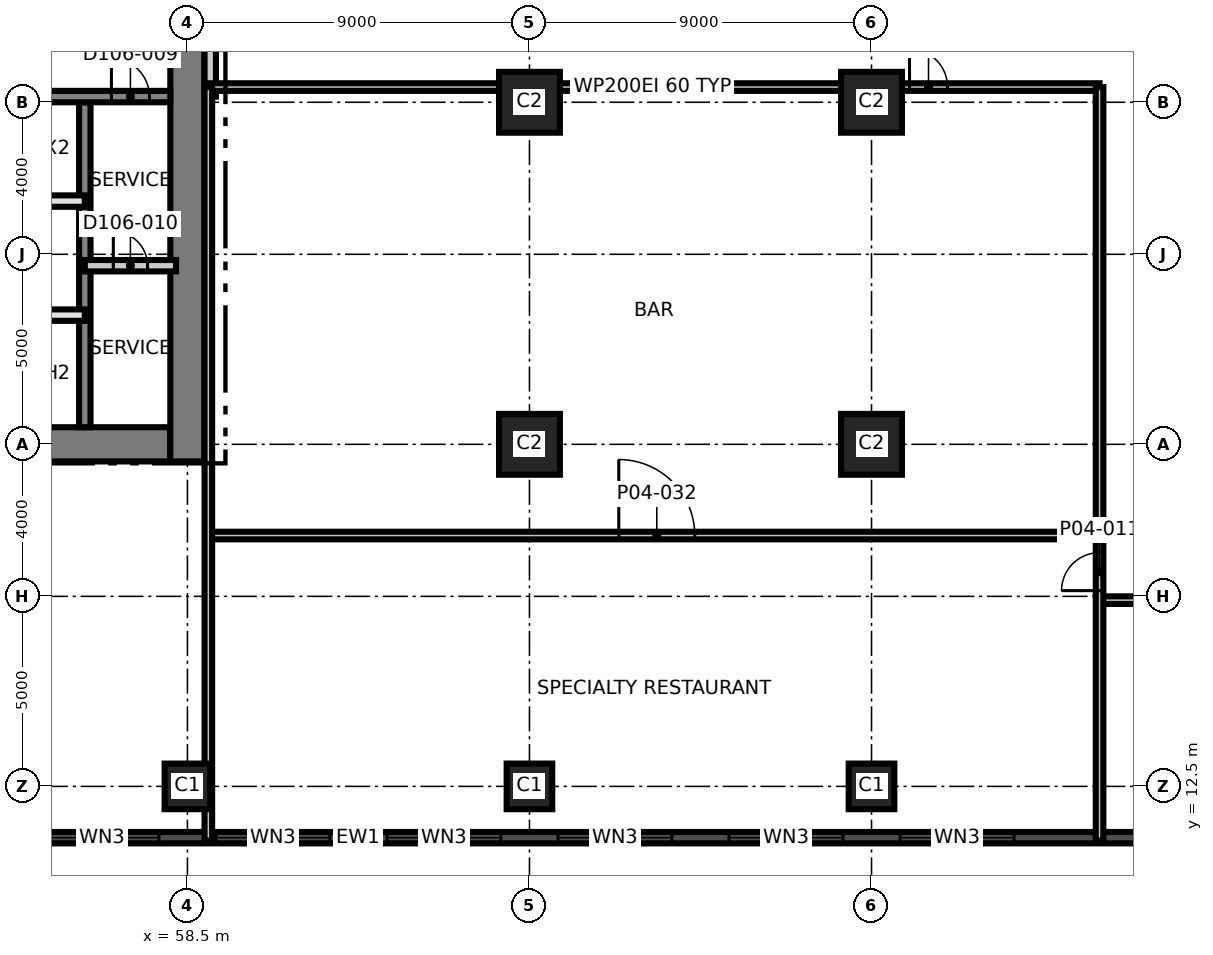
"""IFC4 building model, lengths in metres.
Left out: names, types, materials, properties, quantities, classifications, styles, units other than length and angle.
Written with IfcOpenShell. Run it as: python <this file> out.ifc"""

import sys

from ifc_helpers import new_model, si_unit, direction, frame, frame_2d, origin, origin_2d, place, context, subcontext, project, spatial, rectangle, extrude, element, fill, save


model = new_model("IFC4")
c1 = context("Model", 3, precision=1e-05, world=origin(), true_north=direction((0.0, 1.0)))
c2 = subcontext(c1, "Body", "Model", "MODEL_VIEW")
j1 = project(units=[si_unit("LENGTHUNIT", "METRE"), si_unit("PLANEANGLEUNIT", "RADIAN")], contexts=[c1])
p1 = place(None, origin())
s1 = spatial("IfcSite", under=j1, at=p1, CompositionType="ELEMENT")
p2 = place(p1, origin())
s2 = spatial("IfcBuilding", under=s1, at=p2, CompositionType="ELEMENT")
p3 = place(p2, frame((0.0, 0.0, 23.5)))
s3 = spatial("IfcBuildingStorey", under=s2, at=p3, CompositionType="ELEMENT", Elevation=23.5)
p4 = place(p3, frame((31.05, 21.5, 0.0), z_axis=(0.0, 0.0, 1.0), x_axis=(1.0, 0.0, 0.0)))
e1 = element("IfcWall", 1, at=p4, inside=s3, PredefinedType="SHEAR", context=c2, shape_type="SweptSolid", body=[
    extrude(rectangle(XDim=27.0, YDim=0.9, at=frame_2d((13.5, 0.0))), origin(), (0.0, 0.0, 1.0), 5.0),
])
p5 = place(p3, frame((58.5, 21.05, 0.0), z_axis=(0.0, 0.0, 1.0), x_axis=(0.0, 1.0, 0.0)))
e2 = element("IfcWall", 2, at=p5, inside=s3, PredefinedType="SHEAR", context=c2, shape_type="SweptSolid", body=[
    extrude(rectangle(XDim=18.9, YDim=0.9, at=frame_2d((9.45, 0.0))), origin(), (0.0, 0.0, 1.0), 5.0),
])
p6 = place(p3, frame((55.8, 21.95, 0.0), z_axis=(0.0, 0.0, 1.0), x_axis=(0.0, 1.0, 0.0)))
e3 = element("IfcWall", 3, at=p6, inside=s3, PredefinedType="SHEAR", context=c2, shape_type="SweptSolid", body=[
    extrude(rectangle(XDim=8.55, YDim=0.3, at=frame_2d((4.275, 0.0))), origin(), (0.0, 0.0, 1.0), 5.0),
])
p7 = place(p3, frame((31.95, 30.65, 0.0), z_axis=(0.0, 0.0, 1.0), x_axis=(1.0, 0.0, 0.0)))
e4 = element("IfcWall", 4, at=p7, inside=s3, PredefinedType="SHEAR", context=c2, shape_type="SweptSolid", body=[
    extrude(rectangle(XDim=26.1, YDim=0.3, at=frame_2d((13.05, 0.0))), origin(), (0.0, 0.0, 1.0), 5.0),
])
p8 = place(p7, frame((24.55, 0.0, 0.0)))
e5 = element("IfcOpeningElement", 5, at=p8, cuts=e4, PredefinedType="OPENING", context=c2, shape_type="SweptSolid", body=[
    extrude(rectangle(XDim=1.0, YDim=2.1, at=frame_2d((0.5, 1.05))), frame((0.0, 0.16, 0.0), z_axis=(0.0, -1.0, 0.0), x_axis=(1.0, 0.0, 0.0)), (0.0, 0.0, 1.0), 0.32),
])
p9 = place(p7, frame((11.35, 0.0, 0.0)))
e6 = element("IfcOpeningElement", 6, at=p9, cuts=e4, PredefinedType="OPENING", context=c2, shape_type="SweptSolid", body=[
    extrude(rectangle(XDim=1.0, YDim=2.1, at=frame_2d((0.5, 1.05))), frame((0.0, 0.16, 0.0), z_axis=(0.0, -1.0, 0.0), x_axis=(1.0, 0.0, 0.0)), (0.0, 0.0, 1.0), 0.32),
])
for number, where, z_axis, x_axis in (
    (7, (58.5, 12.5, 0.0), (0.0, 0.0, 1.0), (1.0, 0.0, 0.0)),
    (8, (67.5, 12.5, 0.0), (0.0, 0.0, 1.0), (1.0, 0.0, 0.0)),
    (9, (76.5, 12.5, 0.0), (0.0, 0.0, 1.0), (1.0, 0.0, 0.0)),
):
    element("IfcColumn", number, at=place(p3, frame(where, z_axis=z_axis, x_axis=x_axis)), inside=s3, PredefinedType="COLUMN", context=c2, shape_type="SweptSolid", body=[
        extrude(rectangle(XDim=1.2, YDim=1.2, at=origin_2d()), origin(), (0.0, 0.0, 1.0), 5.0),
    ])
for number, where, z_axis, x_axis in (
    (10, (67.5, 21.5, 0.0), (0.0, 0.0, 1.0), (1.0, 0.0, 0.0)),
    (11, (76.5, 21.5, 0.0), (0.0, 0.0, 1.0), (1.0, 0.0, 0.0)),
    (12, (67.5, 30.5, 0.0), (0.0, 0.0, 1.0), (1.0, 0.0, 0.0)),
    (13, (76.5, 30.5, 0.0), (0.0, 0.0, 1.0), (1.0, 0.0, 0.0)),
):
    element("IfcColumn", number, at=place(p3, frame(where, z_axis=z_axis, x_axis=x_axis)), inside=s3, PredefinedType="COLUMN", context=c2, shape_type="SweptSolid", body=[
        extrude(rectangle(XDim=1.6, YDim=1.6, at=origin_2d()), origin(), (0.0, 0.0, 1.0), 5.0),
    ])
p10 = place(p3, frame((27.048, 11.15, 0.0), z_axis=(0.0, 0.0, 1.0), x_axis=(1.0, 0.0, 0.0)))
e14 = element("IfcWall", 14, at=p10, inside=s3, PredefinedType="SOLIDWALL", context=c2, shape_type="SweptSolid", body=[
    extrude(rectangle(XDim=71.88, YDim=0.3, at=frame_2d((35.94, 0.0))), origin(), (0.0, 0.0, 1.0), 4.7),
])
p11 = place(p10, frame((0.726, 0.0, 0.9)))
e15 = element("IfcOpeningElement", 15, at=p11, cuts=e14, PredefinedType="OPENING", context=c2, shape_type="SweptSolid", body=[
    extrude(rectangle(XDim=3.0, YDim=2.4, at=frame_2d((1.5, 1.2))), frame((0.0, 0.16, 0.0), z_axis=(0.0, -1.0, 0.0), x_axis=(1.0, 0.0, 0.0)), (0.0, 0.0, 1.0), 0.32),
])
p12 = place(p10, frame((5.202, 0.0, 0.9)))
e16 = element("IfcOpeningElement", 16, at=p12, cuts=e14, PredefinedType="OPENING", context=c2, shape_type="SweptSolid", body=[
    extrude(rectangle(XDim=3.0, YDim=2.4, at=frame_2d((1.5, 1.2))), frame((0.0, 0.16, 0.0), z_axis=(0.0, -1.0, 0.0), x_axis=(1.0, 0.0, 0.0)), (0.0, 0.0, 1.0), 0.32),
])
p13 = place(p10, frame((9.702, 0.0, 0.9)))
e17 = element("IfcOpeningElement", 17, at=p13, cuts=e14, PredefinedType="OPENING", context=c2, shape_type="SweptSolid", body=[
    extrude(rectangle(XDim=3.0, YDim=2.4, at=frame_2d((1.5, 1.2))), frame((0.0, 0.16, 0.0), z_axis=(0.0, -1.0, 0.0), x_axis=(1.0, 0.0, 0.0)), (0.0, 0.0, 1.0), 0.32),
])
p14 = place(p10, frame((14.202, 0.0, 0.9)))
e18 = element("IfcOpeningElement", 18, at=p14, cuts=e14, PredefinedType="OPENING", context=c2, shape_type="SweptSolid", body=[
    extrude(rectangle(XDim=3.0, YDim=2.4, at=frame_2d((1.5, 1.2))), frame((0.0, 0.16, 0.0), z_axis=(0.0, -1.0, 0.0), x_axis=(1.0, 0.0, 0.0)), (0.0, 0.0, 1.0), 0.32),
])
p15 = place(p10, frame((18.702, 0.0, 0.9)))
e19 = element("IfcOpeningElement", 19, at=p15, cuts=e14, PredefinedType="OPENING", context=c2, shape_type="SweptSolid", body=[
    extrude(rectangle(XDim=3.0, YDim=2.4, at=frame_2d((1.5, 1.2))), frame((0.0, 0.16, 0.0), z_axis=(0.0, -1.0, 0.0), x_axis=(1.0, 0.0, 0.0)), (0.0, 0.0, 1.0), 0.32),
])
p16 = place(p10, frame((23.202, 0.0, 0.9)))
e20 = element("IfcOpeningElement", 20, at=p16, cuts=e14, PredefinedType="OPENING", context=c2, shape_type="SweptSolid", body=[
    extrude(rectangle(XDim=3.0, YDim=2.4, at=frame_2d((1.5, 1.2))), frame((0.0, 0.16, 0.0), z_axis=(0.0, -1.0, 0.0), x_axis=(1.0, 0.0, 0.0)), (0.0, 0.0, 1.0), 0.32),
])
p17 = place(p10, frame((27.702, 0.0, 0.9)))
e21 = element("IfcOpeningElement", 21, at=p17, cuts=e14, PredefinedType="OPENING", context=c2, shape_type="SweptSolid", body=[
    extrude(rectangle(XDim=3.0, YDim=2.4, at=frame_2d((1.5, 1.2))), frame((0.0, 0.16, 0.0), z_axis=(0.0, -1.0, 0.0), x_axis=(1.0, 0.0, 0.0)), (0.0, 0.0, 1.0), 0.32),
])
p18 = place(p10, frame((32.202, 0.0, 0.9)))
e22 = element("IfcOpeningElement", 22, at=p18, cuts=e14, PredefinedType="OPENING", context=c2, shape_type="SweptSolid", body=[
    extrude(rectangle(XDim=3.0, YDim=2.4, at=frame_2d((1.5, 1.2))), frame((0.0, 0.16, 0.0), z_axis=(0.0, -1.0, 0.0), x_axis=(1.0, 0.0, 0.0)), (0.0, 0.0, 1.0), 0.32),
])
p19 = place(p10, frame((36.702, 0.0, 0.9)))
e23 = element("IfcOpeningElement", 23, at=p19, cuts=e14, PredefinedType="OPENING", context=c2, shape_type="SweptSolid", body=[
    extrude(rectangle(XDim=3.0, YDim=2.4, at=frame_2d((1.5, 1.2))), frame((0.0, 0.16, 0.0), z_axis=(0.0, -1.0, 0.0), x_axis=(1.0, 0.0, 0.0)), (0.0, 0.0, 1.0), 0.32),
])
p20 = place(p10, frame((41.202, 0.0, 0.9)))
e24 = element("IfcOpeningElement", 24, at=p20, cuts=e14, PredefinedType="OPENING", context=c2, shape_type="SweptSolid", body=[
    extrude(rectangle(XDim=3.0, YDim=2.4, at=frame_2d((1.5, 1.2))), frame((0.0, 0.16, 0.0), z_axis=(0.0, -1.0, 0.0), x_axis=(1.0, 0.0, 0.0)), (0.0, 0.0, 1.0), 0.32),
])
p21 = place(p10, frame((45.702, 0.0, 0.9)))
e25 = element("IfcOpeningElement", 25, at=p21, cuts=e14, PredefinedType="OPENING", context=c2, shape_type="SweptSolid", body=[
    extrude(rectangle(XDim=3.0, YDim=2.4, at=frame_2d((1.5, 1.2))), frame((0.0, 0.16, 0.0), z_axis=(0.0, -1.0, 0.0), x_axis=(1.0, 0.0, 0.0)), (0.0, 0.0, 1.0), 0.32),
])
p22 = place(p10, frame((50.202, 0.0, 0.9)))
e26 = element("IfcOpeningElement", 26, at=p22, cuts=e14, PredefinedType="OPENING", context=c2, shape_type="SweptSolid", body=[
    extrude(rectangle(XDim=3.0, YDim=2.4, at=frame_2d((1.5, 1.2))), frame((0.0, 0.16, 0.0), z_axis=(0.0, -1.0, 0.0), x_axis=(1.0, 0.0, 0.0)), (0.0, 0.0, 1.0), 0.32),
])
p23 = place(p10, frame((59.202, 0.0, 0.9)))
e27 = element("IfcOpeningElement", 27, at=p23, cuts=e14, PredefinedType="OPENING", context=c2, shape_type="SweptSolid", body=[
    extrude(rectangle(XDim=3.0, YDim=2.4, at=frame_2d((1.5, 1.2))), frame((0.0, 0.16, 0.0), z_axis=(0.0, -1.0, 0.0), x_axis=(1.0, 0.0, 0.0)), (0.0, 0.0, 1.0), 0.32),
])
p24 = place(p10, frame((63.702, 0.0, 0.9)))
e28 = element("IfcOpeningElement", 28, at=p24, cuts=e14, PredefinedType="OPENING", context=c2, shape_type="SweptSolid", body=[
    extrude(rectangle(XDim=3.0, YDim=2.4, at=frame_2d((1.5, 1.2))), frame((0.0, 0.16, 0.0), z_axis=(0.0, -1.0, 0.0), x_axis=(1.0, 0.0, 0.0)), (0.0, 0.0, 1.0), 0.32),
])
p25 = place(p10, frame((68.226, 0.0, 0.9)))
e29 = element("IfcOpeningElement", 29, at=p25, cuts=e14, PredefinedType="OPENING", context=c2, shape_type="SweptSolid", body=[
    extrude(rectangle(XDim=3.0, YDim=2.4, at=frame_2d((1.5, 1.2))), frame((0.0, 0.16, 0.0), z_axis=(0.0, -1.0, 0.0), x_axis=(1.0, 0.0, 0.0)), (0.0, 0.0, 1.0), 0.32),
])
p26 = place(p3, frame((46.8, 24.9, 0.0), z_axis=(0.0, 0.0, 1.0), x_axis=(1.0, 0.0, 0.0)))
e30 = element("IfcWall", 30, at=p26, inside=s3, PredefinedType="SOLIDWALL", context=c2, shape_type="SweptSolid", body=[
    extrude(rectangle(XDim=9.0, YDim=0.3, at=frame_2d((4.5, 0.0))), origin(), (0.0, 0.0, 1.0), 4.7),
])
p27 = place(p26, frame((1.05, 0.0, 0.0)))
e31 = element("IfcOpeningElement", 31, at=p27, cuts=e30, PredefinedType="OPENING", context=c2, shape_type="SweptSolid", body=[
    extrude(rectangle(XDim=0.9, YDim=2.1, at=frame_2d((0.45, 1.05))), frame((0.0, 0.16, 0.0), z_axis=(0.0, -1.0, 0.0), x_axis=(1.0, 0.0, 0.0)), (0.0, 0.0, 1.0), 0.32),
])
p28 = place(p3, frame((55.8, 26.2, 0.0), z_axis=(0.0, 0.0, 1.0), x_axis=(1.0, 0.0, 0.0)))
e32 = element("IfcWall", 32, at=p28, inside=s3, PredefinedType="PARTITIONING", context=c2, shape_type="SweptSolid", body=[
    extrude(rectangle(XDim=2.4, YDim=0.3, at=frame_2d((1.2, 0.0))), origin(), (0.0, 0.0, 1.0), 4.7),
])
p29 = place(p28, frame((0.75, 0.0, 0.0)))
e33 = element("IfcOpeningElement", 33, at=p29, cuts=e32, PredefinedType="OPENING", context=c2, shape_type="SweptSolid", body=[
    extrude(rectangle(XDim=0.9, YDim=2.1, at=frame_2d((0.45, 1.05))), frame((0.0, 0.16, 0.0), z_axis=(0.0, -1.0, 0.0), x_axis=(1.0, 0.0, 0.0)), (0.0, 0.0, 1.0), 0.32),
])
p30 = place(p3, frame((49.8, 27.9, 0.0), z_axis=(0.0, 0.0, 1.0), x_axis=(1.0, 0.0, 0.0)))
e34 = element("IfcWall", 34, at=p30, inside=s3, PredefinedType="SOLIDWALL", context=c2, shape_type="SweptSolid", body=[
    extrude(rectangle(XDim=6.0, YDim=0.3, at=frame_2d((3.0, 0.0))), origin(), (0.0, 0.0, 1.0), 4.7),
])
p31 = place(p3, frame((59.1, 30.65, 0.0), z_axis=(0.0, 0.0, 1.0), x_axis=(0.0, 1.0, 0.0)))
e35 = element("IfcWall", 35, at=p31, inside=s3, PredefinedType="PARTITIONING", context=c2, shape_type="SweptSolid", body=[
    extrude(rectangle(XDim=2.7, YDim=0.3, at=frame_2d((1.35, 0.0))), origin(), (0.0, 0.0, 1.0), 4.7),
])
p32 = place(p3, frame((82.5, 17.4, 0.0), z_axis=(0.0, 0.0, 1.0), x_axis=(1.0, 0.0, 0.0)))
e36 = element("IfcWall", 36, at=p32, inside=s3, PredefinedType="PARTITIONING", context=c2, shape_type="SweptSolid", body=[
    extrude(rectangle(XDim=2.1, YDim=0.2, at=frame_2d((1.05, 0.0))), origin(), (0.0, 0.0, 1.0), 4.7),
])
p33 = place(p3, frame((59.05, 19.1, 0.0), z_axis=(0.0, 0.0, 1.0), x_axis=(1.0, 0.0, 0.0)))
e37 = element("IfcWall", 37, at=p33, inside=s3, PredefinedType="PARTITIONING", context=c2, shape_type="SweptSolid", body=[
    extrude(rectangle(XDim=23.45, YDim=0.2, at=frame_2d((11.725, 0.0))), origin(), (0.0, 0.0, 1.0), 4.7),
])
p34 = place(p33, frame((10.8, 0.0, 0.0)))
e38 = element("IfcOpeningElement", 38, at=p34, cuts=e37, PredefinedType="OPENING", context=c2, shape_type="SweptSolid", body=[
    extrude(rectangle(XDim=2.0, YDim=2.1, at=frame_2d((1.0, 1.05))), frame((0.0, 0.11, 0.0), z_axis=(0.0, -1.0, 0.0), x_axis=(1.0, 0.0, 0.0)), (0.0, 0.0, 1.0), 0.22),
])
p35 = place(p3, frame((58.97, 30.9, 0.0), z_axis=(0.0, 0.0, 1.0), x_axis=(1.0, 0.0, 0.0)))
e39 = element("IfcWall", 39, at=p35, inside=s3, PredefinedType="PARTITIONING", context=c2, shape_type="SweptSolid", body=[
    extrude(rectangle(XDim=23.53, YDim=0.2, at=frame_2d((11.765, 0.0))), origin(), (0.0, 0.0, 1.0), 4.7),
])
p36 = place(p35, frame((18.53, 0.0, 0.0)))
e40 = element("IfcOpeningElement", 40, at=p36, cuts=e39, PredefinedType="OPENING", context=c2, shape_type="SweptSolid", body=[
    extrude(rectangle(XDim=1.0, YDim=2.1, at=frame_2d((0.5, 1.05))), frame((0.0, 0.11, 0.0), z_axis=(0.0, -1.0, 0.0), x_axis=(1.0, 0.0, 0.0)), (0.0, 0.0, 1.0), 0.22),
])
p37 = place(p3, frame((59.05, 11.07, 0.0), z_axis=(0.0, 0.0, 1.0), x_axis=(0.0, 1.0, 0.0)))
e41 = element("IfcWall", 41, at=p37, inside=s3, PredefinedType="PARTITIONING", context=c2, shape_type="SweptSolid", body=[
    extrude(rectangle(XDim=19.83, YDim=0.2, at=frame_2d((9.915, 0.0))), origin(), (0.0, 0.0, 1.0), 4.7),
])
p38 = place(p3, frame((82.5, 11.07, 0.0), z_axis=(0.0, 0.0, 1.0), x_axis=(0.0, 1.0, 0.0)))
e42 = element("IfcWall", 42, at=p38, inside=s3, PredefinedType="PARTITIONING", context=c2, shape_type="SweptSolid", body=[
    extrude(rectangle(XDim=19.83, YDim=0.2, at=frame_2d((9.915, 0.0))), origin(), (0.0, 0.0, 1.0), 4.7),
])
p39 = place(p38, frame((6.58, 0.0, 0.0)))
e43 = element("IfcOpeningElement", 43, at=p39, cuts=e42, PredefinedType="OPENING", context=c2, shape_type="SweptSolid", body=[
    extrude(rectangle(XDim=1.0, YDim=2.1, at=frame_2d((0.5, 1.05))), frame((0.0, 0.11, 0.0), z_axis=(0.0, -1.0, 0.0), x_axis=(1.0, 0.0, 0.0)), (0.0, 0.0, 1.0), 0.22),
])
p40 = place(p17, origin())
e44 = element("IfcWindow", 44, at=p40, inside=s3, PartitioningType="SINGLE_PANEL", PredefinedType="WINDOW", context=c2, shape_type="SweptSolid", body=[
    extrude(rectangle(XDim=3.0, YDim=2.4, at=frame_2d((1.5, 1.2))), frame((0.0, 0.03, 0.0), z_axis=(0.0, -1.0, 0.0), x_axis=(1.0, 0.0, 0.0)), (0.0, 0.0, 1.0), 0.06),
])
fill(e21, e44)
p41 = place(p18, origin())
e45 = element("IfcWindow", 45, at=p41, inside=s3, PartitioningType="SINGLE_PANEL", PredefinedType="WINDOW", context=c2, shape_type="SweptSolid", body=[
    extrude(rectangle(XDim=3.0, YDim=2.4, at=frame_2d((1.5, 1.2))), frame((0.0, 0.03, 0.0), z_axis=(0.0, -1.0, 0.0), x_axis=(1.0, 0.0, 0.0)), (0.0, 0.0, 1.0), 0.06),
])
fill(e22, e45)
p42 = place(p19, origin())
e46 = element("IfcWindow", 46, at=p42, inside=s3, PartitioningType="SINGLE_PANEL", PredefinedType="WINDOW", context=c2, shape_type="SweptSolid", body=[
    extrude(rectangle(XDim=3.0, YDim=2.4, at=frame_2d((1.5, 1.2))), frame((0.0, 0.03, 0.0), z_axis=(0.0, -1.0, 0.0), x_axis=(1.0, 0.0, 0.0)), (0.0, 0.0, 1.0), 0.06),
])
fill(e23, e46)
p43 = place(p20, origin())
e47 = element("IfcWindow", 47, at=p43, inside=s3, PartitioningType="SINGLE_PANEL", PredefinedType="WINDOW", context=c2, shape_type="SweptSolid", body=[
    extrude(rectangle(XDim=3.0, YDim=2.4, at=frame_2d((1.5, 1.2))), frame((0.0, 0.03, 0.0), z_axis=(0.0, -1.0, 0.0), x_axis=(1.0, 0.0, 0.0)), (0.0, 0.0, 1.0), 0.06),
])
fill(e24, e47)
p44 = place(p21, origin())
e48 = element("IfcWindow", 48, at=p44, inside=s3, PartitioningType="SINGLE_PANEL", PredefinedType="WINDOW", context=c2, shape_type="SweptSolid", body=[
    extrude(rectangle(XDim=3.0, YDim=2.4, at=frame_2d((1.5, 1.2))), frame((0.0, 0.03, 0.0), z_axis=(0.0, -1.0, 0.0), x_axis=(1.0, 0.0, 0.0)), (0.0, 0.0, 1.0), 0.06),
])
fill(e25, e48)
p45 = place(p22, origin())
e49 = element("IfcWindow", 49, at=p45, inside=s3, PartitioningType="SINGLE_PANEL", PredefinedType="WINDOW", context=c2, shape_type="SweptSolid", body=[
    extrude(rectangle(XDim=3.0, YDim=2.4, at=frame_2d((1.5, 1.2))), frame((0.0, 0.03, 0.0), z_axis=(0.0, -1.0, 0.0), x_axis=(1.0, 0.0, 0.0)), (0.0, 0.0, 1.0), 0.06),
])
fill(e26, e49)
p46 = place(p8, origin())
e50 = element("IfcDoor", 50, at=p46, inside=s3, OperationType="SINGLE_SWING_LEFT", PredefinedType="DOOR", context=c2, shape_type="SweptSolid", body=[
    extrude(rectangle(XDim=1.0, YDim=2.1, at=frame_2d((0.5, 1.05))), frame((0.0, 0.025, 0.0), z_axis=(0.0, -1.0, 0.0), x_axis=(1.0, 0.0, 0.0)), (0.0, 0.0, 1.0), 0.05),
])
fill(e5, e50)
p47 = place(p29, origin())
e51 = element("IfcDoor", 51, at=p47, inside=s3, OperationType="SINGLE_SWING_RIGHT", PredefinedType="DOOR", context=c2, shape_type="SweptSolid", body=[
    extrude(rectangle(XDim=0.9, YDim=2.1, at=frame_2d((0.45, 1.05))), frame((0.0, 0.025, 0.0), z_axis=(0.0, -1.0, 0.0), x_axis=(1.0, 0.0, 0.0)), (0.0, 0.0, 1.0), 0.05),
])
fill(e33, e51)
p48 = place(p39, origin())
e52 = element("IfcDoor", 52, at=p48, inside=s3, OperationType="SINGLE_SWING_LEFT", PredefinedType="DOOR", context=c2, shape_type="SweptSolid", body=[
    extrude(rectangle(XDim=1.0, YDim=2.1, at=frame_2d((0.5, 1.05))), frame((0.0, 0.025, 0.0), z_axis=(0.0, -1.0, 0.0), x_axis=(1.0, 0.0, 0.0)), (0.0, 0.0, 1.0), 0.05),
])
fill(e43, e52)
p49 = place(p36, origin())
e53 = element("IfcDoor", 53, at=p49, inside=s3, OperationType="SINGLE_SWING_RIGHT", PredefinedType="DOOR", context=c2, shape_type="SweptSolid", body=[
    extrude(rectangle(XDim=1.0, YDim=2.1, at=frame_2d((0.5, 1.05))), frame((0.0, 0.025, 0.0), z_axis=(0.0, -1.0, 0.0), x_axis=(1.0, 0.0, 0.0)), (0.0, 0.0, 1.0), 0.05),
])
fill(e40, e53)
p50 = place(p34, origin())
e54 = element("IfcDoor", 54, at=p50, inside=s3, OperationType="SINGLE_SWING_RIGHT", PredefinedType="DOOR", context=c2, shape_type="SweptSolid", body=[
    extrude(rectangle(XDim=2.0, YDim=2.1, at=frame_2d((1.0, 1.05))), frame((0.0, 0.025, 0.0), z_axis=(0.0, -1.0, 0.0), x_axis=(1.0, 0.0, 0.0)), (0.0, 0.0, 1.0), 0.05),
])
fill(e38, e54)
save(model, sys.argv[1])
